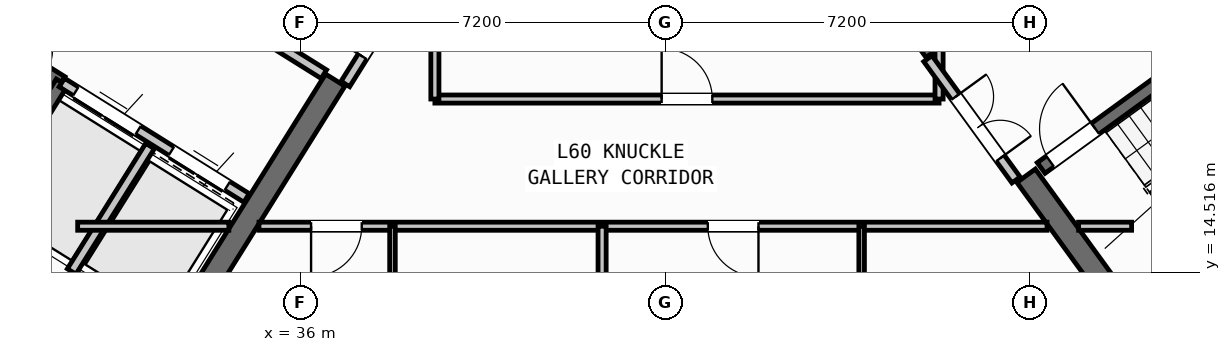
"""IFC4 building model, lengths in metres.
Left out: names, types, materials, properties, quantities, classifications, styles, units other than length and angle.
Written with IfcOpenShell. Run it as: python <this file> out.ifc"""

import sys

from ifc_helpers import new_model, si_unit, direction, frame, frame_2d, origin, place, context, subcontext, project, spatial, rectangle, extrude, source, transform, mapped, element, fill, save


model = new_model("IFC4")
c1 = context("Model", 3, precision=1e-05, world=origin(), true_north=direction((0.0, 1.0)))
c2 = subcontext(c1, "Body", "Model", "MODEL_VIEW")
j1 = project(units=[si_unit("LENGTHUNIT", "METRE"), si_unit("PLANEANGLEUNIT", "RADIAN")], contexts=[c1])
p1 = place(None, origin())
s1 = spatial("IfcSite", under=j1, at=p1, CompositionType="ELEMENT")
p2 = place(p1, origin())
s2 = spatial("IfcBuilding", under=s1, at=p2, CompositionType="ELEMENT")
p3 = place(p2, frame((0.0, 0.0, 238.5)))
s3 = spatial("IfcBuildingStorey", under=s2, at=p3, CompositionType="ELEMENT", Elevation=238.5)
p4 = place(p3, frame((33.324, 12.503, 0.0), z_axis=(0.0, 0.0, 1.0), x_axis=(-0.848043529849, 0.529926571782, 0.0)))
e1 = element("IfcWall", 1, at=p4, inside=s3, PredefinedType="SHEAR", context=c2, shape_type="SweptSolid", body=[
    extrude(rectangle(XDim=13.04, YDim=0.45, at=frame_2d((6.52, 0.0))), origin(), (0.0, 0.0, 1.0), 3.35),
])
p5 = place(p3, frame((36.683, 18.304, 0.0), z_axis=(0.0, 0.0, 1.0), x_axis=(-0.529904039071, -0.848057609704, 0.0)))
e2 = element("IfcWall", 2, at=p5, inside=s3, PredefinedType="SHEAR", context=c2, shape_type="SweptSolid", body=[
    extrude(rectangle(XDim=6.475, YDim=0.45, at=frame_2d((3.238, 0.0))), origin(), (0.0, 0.0, 1.0), 3.35),
])
p6 = place(p3, frame((52.399, 13.169, 0.0), z_axis=(0.0, 0.0, 1.0), x_axis=(0.809022352778, 0.587777877013, 0.0)))
e3 = element("IfcWall", 3, at=p6, inside=s3, PredefinedType="SHEAR", context=c2, shape_type="SweptSolid", body=[
    extrude(rectangle(XDim=12.24, YDim=0.45, at=frame_2d((6.12, 0.0))), origin(), (0.0, 0.0, 1.0), 3.35),
])
p7 = place(p3, frame((52.449, 13.483, 0.0), z_axis=(0.0, 0.0, 1.0), x_axis=(-0.587819244441, 0.808992296542, 0.0)))
e4 = element("IfcWall", 4, at=p7, inside=s3, PredefinedType="SHEAR", context=c2, shape_type="SweptSolid", body=[
    extrude(rectangle(XDim=3.625, YDim=0.45, at=frame_2d((1.812, 0.0))), origin(), (0.0, 0.0, 1.0), 3.35),
])
p8 = place(p3, frame((48.526, 18.884, 0.0), z_axis=(0.0, 0.0, 1.0), x_axis=(-0.587774812919, 0.809024578921, 0.0)))
e5 = element("IfcWall", 5, at=p8, inside=s3, PredefinedType="SHEAR", context=c2, shape_type="SweptSolid", body=[
    extrude(rectangle(XDim=6.475, YDim=0.45, at=frame_2d((3.238, 0.0))), origin(), (0.0, 0.0, 1.0), 3.35),
])
p9 = place(p3, frame((31.28, 18.261, 0.0), z_axis=(0.0, 0.0, 1.0), x_axis=(-0.848051618787, 0.529913626805, 0.0)))
e6 = element("IfcWall", 6, at=p9, inside=s3, PredefinedType="SHEAR", context=c2, shape_type="SweptSolid", body=[
    extrude(rectangle(XDim=7.46, YDim=0.26, at=frame_2d((3.73, 0.0))), origin(), (0.0, 0.0, 1.0), 3.35),
])
p10 = place(p9, frame((0.36, 0.0, 0.0)))
e7 = element("IfcOpeningElement", 7, at=p10, cuts=e6, PredefinedType="OPENING", context=c2, shape_type="SweptSolid", body=[
    extrude(rectangle(XDim=0.86, YDim=2.05, at=frame_2d((0.43, 1.025))), frame((0.0, 0.14, 0.0), z_axis=(0.0, -1.0, 0.0), x_axis=(1.0, 0.0, 0.0)), (0.0, 0.0, 1.0), 0.28),
])
p11 = place(p3, frame((31.288, 18.256, 0.0), z_axis=(0.0, 0.0, 1.0), x_axis=(-0.529943379326, -0.848033026897, 0.0)))
e8 = element("IfcWall", 8, at=p11, inside=s3, PredefinedType="SHEAR", context=c2, shape_type="SweptSolid", body=[
    extrude(rectangle(XDim=3.16, YDim=0.26, at=frame_2d((1.58, 0.0))), origin(), (0.0, 0.0, 1.0), 3.35),
])
p12 = place(p3, frame((34.933, 15.978, 0.0), z_axis=(0.0, 0.0, 1.0), x_axis=(-0.848055739377, 0.529907032327, 0.0)))
e9 = element("IfcWall", 9, at=p12, inside=s3, PredefinedType="STANDARD", context=c2, shape_type="SweptSolid", body=[
    extrude(rectangle(XDim=4.298, YDim=0.2, at=frame_2d((2.149, 0.0))), origin(), (0.0, 0.0, 1.0), 3.34),
])
p13 = place(p12, frame((0.448, 0.0, 0.0)))
e10 = element("IfcOpeningElement", 10, at=p13, cuts=e9, PredefinedType="OPENING", context=c2, shape_type="SweptSolid", body=[
    extrude(rectangle(XDim=1.3, YDim=2.2, at=frame_2d((0.65, 1.1))), frame((0.0, 0.11, 0.0), z_axis=(0.0, -1.0, 0.0), x_axis=(1.0, 0.0, 0.0)), (0.0, 0.0, 1.0), 0.22),
])
p14 = place(p12, frame((2.523, 0.0, 0.0)))
e11 = element("IfcOpeningElement", 11, at=p14, cuts=e9, PredefinedType="OPENING", context=c2, shape_type="SweptSolid", body=[
    extrude(rectangle(XDim=1.45, YDim=2.25, at=frame_2d((0.725, 1.125))), frame((0.0, 0.11, 0.0), z_axis=(0.0, -1.0, 0.0), x_axis=(1.0, 0.0, 0.0)), (0.0, 0.0, 1.0), 0.22),
])
p15 = place(p3, frame((36.459, 18.421, 0.0), z_axis=(0.0, 0.0, 1.0), x_axis=(-0.848059591691, 0.529900867089, 0.0)))
e12 = element("IfcWall", 12, at=p15, inside=s3, PredefinedType="STANDARD", context=c2, shape_type="SweptSolid", body=[
    extrude(rectangle(XDim=5.818, YDim=0.2, at=frame_2d((2.909, 0.0))), origin(), (0.0, 0.0, 1.0), 3.34),
])
p16 = place(p15, frame((2.598, 0.0, 0.0)))
e13 = element("IfcOpeningElement", 13, at=p16, cuts=e12, PredefinedType="OPENING", context=c2, shape_type="SweptSolid", body=[
    extrude(rectangle(XDim=1.15, YDim=2.1, at=frame_2d((0.575, 1.05))), frame((0.0, 0.11, 0.0), z_axis=(0.0, -1.0, 0.0), x_axis=(1.0, 0.0, 0.0)), (0.0, 0.0, 1.0), 0.22),
])
p17 = place(p3, frame((33.029, 17.003, 0.0), z_axis=(0.0, 0.0, 1.0), x_axis=(-0.529916267533, -0.848049968695, 0.0)))
e14 = element("IfcWall", 14, at=p17, inside=s3, PredefinedType="STANDARD", context=c2, shape_type="SweptSolid", body=[
    extrude(rectangle(XDim=2.92, YDim=0.2, at=frame_2d((1.46, 0.0))), origin(), (0.0, 0.0, 1.0), 3.34),
])
p18 = place(p3, frame((52.472, 14.013, 0.0), z_axis=(0.0, 0.0, 1.0), x_axis=(0.809028366311, 0.587769599847, 0.0)))
e15 = element("IfcWall", 15, at=p18, inside=s3, PredefinedType="SHEAR", context=c2, shape_type="SweptSolid", body=[
    extrude(rectangle(XDim=7.33, YDim=0.26, at=frame_2d((3.665, 0.0))), origin(), (0.0, 0.0, 1.0), 3.35),
])
p19 = place(p3, frame((50.615, 16.57, 0.0), z_axis=(0.0, 0.0, 1.0), x_axis=(0.809028366311, 0.587769599847, 0.0)))
e16 = element("IfcWall", 16, at=p19, inside=s3, PredefinedType="SHEAR", context=c2, shape_type="SweptSolid", body=[
    extrude(rectangle(XDim=7.33, YDim=0.26, at=frame_2d((3.665, 0.0))), origin(), (0.0, 0.0, 1.0), 3.35),
])
p20 = place(p19, frame((0.22, 0.0, 0.0)))
e17 = element("IfcOpeningElement", 17, at=p20, cuts=e16, PredefinedType="OPENING", context=c2, shape_type="SweptSolid", body=[
    extrude(rectangle(XDim=1.1, YDim=2.1, at=frame_2d((0.55, 1.05))), frame((0.0, 0.14, 0.0), z_axis=(0.0, -1.0, 0.0), x_axis=(1.0, 0.0, 0.0)), (0.0, 0.0, 1.0), 0.28),
])
p21 = place(p3, frame((32.164, 10.374, 0.0), z_axis=(0.0, 0.0, 1.0), x_axis=(-0.848044107957, 0.529925646633, 0.0)))
e18 = element("IfcWall", 18, at=p21, inside=s3, PredefinedType="PARTITIONING", context=c2, shape_type="SweptSolid", body=[
    extrude(rectangle(XDim=15.57, YDim=0.16, at=frame_2d((7.785, 0.0))), origin(), (0.0, 0.0, 1.0), 3.34),
])
p22 = place(p21, frame((10.83, 0.0, 0.0)))
e19 = element("IfcOpeningElement", 19, at=p22, cuts=e18, PredefinedType="OPENING", context=c2, shape_type="SweptSolid", body=[
    extrude(rectangle(XDim=1.0, YDim=2.1, at=frame_2d((0.5, 1.05))), frame((0.0, 0.09, 0.0), z_axis=(0.0, -1.0, 0.0), x_axis=(1.0, 0.0, 0.0)), (0.0, 0.0, 1.0), 0.18),
])
p23 = place(p3, frame((38.451, 20.737, 0.0), z_axis=(0.0, 0.0, 1.0), x_axis=(-0.529924799939, -0.848044637038, 0.0)))
e20 = element("IfcWall", 20, at=p23, inside=s3, PredefinedType="STANDARD", context=c2, shape_type="SweptSolid", body=[
    extrude(rectangle(XDim=2.96, YDim=0.2, at=frame_2d((1.48, 0.0))), origin(), (0.0, 0.0, 1.0), 3.34),
])
p24 = place(p23, frame((1.46, 0.0, 0.0)))
e21 = element("IfcOpeningElement", 21, at=p24, cuts=e20, PredefinedType="OPENING", context=c2, shape_type="SweptSolid", body=[
    extrude(rectangle(XDim=0.86, YDim=2.05, at=frame_2d((0.43, 1.025))), frame((0.0, 0.11, 0.0), z_axis=(0.0, -1.0, 0.0), x_axis=(1.0, 0.0, 0.0)), (0.0, 0.0, 1.0), 0.22),
])
p25 = place(p3, frame((31.6, 15.42, 0.0), z_axis=(0.0, 0.0, 1.0), x_axis=(1.0, 0.0, 0.0)))
e22 = element("IfcWall", 22, at=p25, inside=s3, PredefinedType="PARTITIONING", context=c2, shape_type="SweptSolid", body=[
    extrude(rectangle(XDim=2.984, YDim=0.16, at=frame_2d((1.492, 0.0))), origin(), (0.0, 0.0, 1.0), 3.34),
])
p26 = place(p3, frame((35.178, 15.42, 0.0), z_axis=(0.0, 0.0, 1.0), x_axis=(1.0, 0.0, 0.0)))
e23 = element("IfcWall", 23, at=p26, inside=s3, PredefinedType="PARTITIONING", context=c2, shape_type="SweptSolid", body=[
    extrude(rectangle(XDim=15.552, YDim=0.16, at=frame_2d((7.776, 0.0))), origin(), (0.0, 0.0, 1.0), 3.34),
])
p27 = place(p26, frame((1.028, 0.0, 0.0)))
e24 = element("IfcOpeningElement", 24, at=p27, cuts=e23, PredefinedType="OPENING", context=c2, shape_type="SweptSolid", body=[
    extrude(rectangle(XDim=1.0, YDim=2.1, at=frame_2d((0.5, 1.05))), frame((0.0, 0.09, 0.0), z_axis=(0.0, -1.0, 0.0), x_axis=(1.0, 0.0, 0.0)), (0.0, 0.0, 1.0), 0.18),
])
p28 = place(p26, frame((8.858, 0.0, 0.0)))
e25 = element("IfcOpeningElement", 25, at=p28, cuts=e23, PredefinedType="OPENING", context=c2, shape_type="SweptSolid", body=[
    extrude(rectangle(XDim=1.0, YDim=2.1, at=frame_2d((0.5, 1.05))), frame((0.0, 0.09, 0.0), z_axis=(0.0, -1.0, 0.0), x_axis=(1.0, 0.0, 0.0)), (0.0, 0.0, 1.0), 0.18),
])
p29 = place(p3, frame((51.354, 15.42, 0.0), z_axis=(0.0, 0.0, 1.0), x_axis=(1.0, 0.0, 0.0)))
e26 = element("IfcWall", 26, at=p29, inside=s3, PredefinedType="PARTITIONING", context=c2, shape_type="SweptSolid", body=[
    extrude(rectangle(XDim=1.046, YDim=0.16, at=frame_2d((0.523, 0.0))), origin(), (0.0, 0.0, 1.0), 3.34),
])
p30 = place(p3, frame((38.65, 17.93, 0.0), z_axis=(0.0, 0.0, 1.0), x_axis=(1.0, 0.0, 0.0)))
e27 = element("IfcWall", 27, at=p30, inside=s3, PredefinedType="PARTITIONING", context=c2, shape_type="SweptSolid", body=[
    extrude(rectangle(XDim=9.95, YDim=0.16, at=frame_2d((4.975, 0.0))), origin(), (0.0, 0.0, 1.0), 3.34),
])
p31 = place(p30, frame((4.475, 0.0, 0.0)))
e28 = element("IfcOpeningElement", 28, at=p31, cuts=e27, PredefinedType="OPENING", context=c2, shape_type="SweptSolid", body=[
    extrude(rectangle(XDim=1.0, YDim=2.1, at=frame_2d((0.5, 1.05))), frame((0.0, 0.09, 0.0), z_axis=(0.0, -1.0, 0.0), x_axis=(1.0, 0.0, 0.0)), (0.0, 0.0, 1.0), 0.18),
])
p32 = place(p3, frame((38.65, 17.93, 0.0), z_axis=(0.0, 0.0, 1.0), x_axis=(0.0, 1.0, 0.0)))
e29 = element("IfcWall", 29, at=p32, inside=s3, PredefinedType="PARTITIONING", context=c2, shape_type="SweptSolid", body=[
    extrude(rectangle(XDim=3.046, YDim=0.16, at=frame_2d((1.523, 0.0))), origin(), (0.0, 0.0, 1.0), 3.34),
])
p33 = place(p3, frame((48.6, 17.93, 0.0), z_axis=(0.0, 0.0, 1.0), x_axis=(0.0, 1.0, 0.0)))
e30 = element("IfcWall", 30, at=p33, inside=s3, PredefinedType="PARTITIONING", context=c2, shape_type="SweptSolid", body=[
    extrude(rectangle(XDim=0.993, YDim=0.16, at=frame_2d((0.496, 0.0))), origin(), (0.0, 0.0, 1.0), 3.34),
])
p34 = place(p3, frame((50.119, 16.333, 0.0), z_axis=(0.0, 0.0, 1.0), x_axis=(-0.587749856981, 0.809042709391, 0.0)))
e31 = element("IfcWall", 31, at=p34, inside=s3, PredefinedType="STANDARD", context=c2, shape_type="SweptSolid", body=[
    extrude(rectangle(XDim=2.96, YDim=0.2, at=frame_2d((1.48, 0.0))), origin(), (0.0, 0.0, 1.0), 3.34),
])
p35 = place(p34, frame((0.53, 0.0, 0.0)))
e32 = element("IfcOpeningElement", 32, at=p35, cuts=e31, PredefinedType="OPENING", context=c2, shape_type="SweptSolid", body=[
    extrude(rectangle(XDim=1.5, YDim=2.15, at=frame_2d((0.75, 1.075))), frame((0.0, 0.11, 0.0), z_axis=(0.0, -1.0, 0.0), x_axis=(1.0, 0.0, 0.0)), (0.0, 0.0, 1.0), 0.22),
])
p36 = place(p3, frame((41.95, 1.96, 0.0), z_axis=(0.0, 0.0, 1.0), x_axis=(0.0, 1.0, 0.0)))
e33 = element("IfcWall", 33, at=p36, inside=s3, PredefinedType="PARTITIONING", context=c2, shape_type="SweptSolid", body=[
    extrude(rectangle(XDim=13.46, YDim=0.16, at=frame_2d((6.73, 0.0))), origin(), (0.0, 0.0, 1.0), 3.34),
])
p37 = place(p3, frame((37.813, 1.96, 0.0), z_axis=(0.0, 0.0, 1.0), x_axis=(0.0, 1.0, 0.0)))
e34 = element("IfcWall", 34, at=p37, inside=s3, PredefinedType="PARTITIONING", context=c2, shape_type="SweptSolid", body=[
    extrude(rectangle(XDim=13.46, YDim=0.11, at=frame_2d((6.73, 0.0))), origin(), (0.0, 0.0, 1.0), 3.34),
])
p38 = place(p37, frame((5.5, 0.0, 0.0)))
e35 = element("IfcOpeningElement", 35, at=p38, cuts=e34, PredefinedType="OPENING", context=c2, shape_type="SweptSolid", body=[
    extrude(rectangle(XDim=0.92, YDim=2.08, at=frame_2d((0.46, 1.04))), frame((0.0, 0.065, 0.0), z_axis=(0.0, -1.0, 0.0), x_axis=(1.0, 0.0, 0.0)), (0.0, 0.0, 1.0), 0.13),
])
p39 = place(p37, frame((10.89, 0.0, 0.0)))
e36 = element("IfcOpeningElement", 36, at=p39, cuts=e34, PredefinedType="OPENING", context=c2, shape_type="SweptSolid", body=[
    extrude(rectangle(XDim=0.88, YDim=2.08, at=frame_2d((0.44, 1.04))), frame((0.0, 0.065, 0.0), z_axis=(0.0, -1.0, 0.0), x_axis=(1.0, 0.0, 0.0)), (0.0, 0.0, 1.0), 0.13),
])
p40 = place(p3, frame((47.072, 1.96, 0.0), z_axis=(0.0, 0.0, 1.0), x_axis=(0.0, 1.0, 0.0)))
e37 = element("IfcWall", 37, at=p40, inside=s3, PredefinedType="PARTITIONING", context=c2, shape_type="SweptSolid", body=[
    extrude(rectangle(XDim=13.46, YDim=0.11, at=frame_2d((6.73, 0.0))), origin(), (0.0, 0.0, 1.0), 3.34),
])
p41 = place(p40, frame((6.6, 0.0, 0.0)))
e38 = element("IfcOpeningElement", 38, at=p41, cuts=e37, PredefinedType="OPENING", context=c2, shape_type="SweptSolid", body=[
    extrude(rectangle(XDim=0.92, YDim=2.08, at=frame_2d((0.46, 1.04))), frame((0.0, 0.065, 0.0), z_axis=(0.0, -1.0, 0.0), x_axis=(1.0, 0.0, 0.0)), (0.0, 0.0, 1.0), 0.13),
])
p42 = place(p40, frame((11.54, 0.0, 0.0)))
e39 = element("IfcOpeningElement", 39, at=p42, cuts=e37, PredefinedType="OPENING", context=c2, shape_type="SweptSolid", body=[
    extrude(rectangle(XDim=0.88, YDim=2.08, at=frame_2d((0.44, 1.04))), frame((0.0, 0.065, 0.0), z_axis=(0.0, -1.0, 0.0), x_axis=(1.0, 0.0, 0.0)), (0.0, 0.0, 1.0), 0.13),
])
m1 = source(origin(), c2, "Body", "SweptSolid", [
    extrude(rectangle(XDim=1.3, YDim=2.2, at=frame_2d((0.65, 1.1))), frame((0.0, 0.025, 0.0), z_axis=(0.0, -1.0, 0.0), x_axis=(1.0, 0.0, 0.0)), (0.0, 0.0, 1.0), 0.05),
])
p43 = place(p13, origin())
e40 = element("IfcDoor", 40, at=p43, inside=s3, OperationType="DOUBLE_DOOR_SLIDING", PredefinedType="DOOR", context=c2, shape_type="MappedRepresentation", body=[
    mapped(m1, transform((0.0, 0.0, 0.0), scale=1.0)),
])
fill(e10, e40)
m2 = source(origin(), c2, "Body", "SweptSolid", [
    extrude(rectangle(XDim=1.45, YDim=2.25, at=frame_2d((0.725, 1.125))), frame((0.0, 0.025, 0.0), z_axis=(0.0, -1.0, 0.0), x_axis=(1.0, 0.0, 0.0)), (0.0, 0.0, 1.0), 0.05),
])
p44 = place(p14, origin())
e41 = element("IfcDoor", 41, at=p44, inside=s3, OperationType="DOUBLE_DOOR_SLIDING", PredefinedType="DOOR", context=c2, shape_type="MappedRepresentation", body=[
    mapped(m2, transform((0.0, 0.0, 0.0), scale=1.0)),
])
fill(e11, e41)
m3 = source(origin(), c2, "Body", "SweptSolid", [
    extrude(rectangle(XDim=1.1, YDim=2.1, at=frame_2d((0.55, 1.05))), frame((0.0, 0.025, 0.0), z_axis=(0.0, -1.0, 0.0), x_axis=(1.0, 0.0, 0.0)), (0.0, 0.0, 1.0), 0.05),
])
p45 = place(p20, origin())
e42 = element("IfcDoor", 42, at=p45, inside=s3, OperationType="SINGLE_SWING_RIGHT", PredefinedType="DOOR", context=c2, shape_type="MappedRepresentation", body=[
    mapped(m3, transform((0.0, 0.0, 0.0), scale=1.0)),
])
fill(e17, e42)
m4 = source(origin(), c2, "Body", "SweptSolid", [
    extrude(rectangle(XDim=1.0, YDim=2.1, at=frame_2d((0.5, 1.05))), frame((0.0, 0.025, 0.0), z_axis=(0.0, -1.0, 0.0), x_axis=(1.0, 0.0, 0.0)), (0.0, 0.0, 1.0), 0.05),
])
p46 = place(p31, origin())
e43 = element("IfcDoor", 43, at=p46, inside=s3, OperationType="SINGLE_SWING_LEFT", PredefinedType="DOOR", context=c2, shape_type="MappedRepresentation", body=[
    mapped(m4, transform((0.0, 0.0, 0.0), scale=1.0)),
])
fill(e28, e43)
m5 = source(origin(), c2, "Body", "SweptSolid", [
    extrude(rectangle(XDim=0.86, YDim=2.05, at=frame_2d((0.43, 1.025))), frame((0.0, 0.025, 0.0), z_axis=(0.0, -1.0, 0.0), x_axis=(1.0, 0.0, 0.0)), (0.0, 0.0, 1.0), 0.05),
])
p47 = place(p24, frame((0.86, 0.0, 0.0), z_axis=(0.0, 0.0, 1.0), x_axis=(-1.0, 0.0, 0.0)))
e44 = element("IfcDoor", 44, at=p47, inside=s3, OperationType="SINGLE_SWING_LEFT", PredefinedType="DOOR", context=c2, shape_type="MappedRepresentation", body=[
    mapped(m5, transform((0.0, 0.0, 0.0), scale=1.0)),
])
fill(e21, e44)
m6 = source(origin(), c2, "Body", "SweptSolid", [
    extrude(rectangle(XDim=1.5, YDim=2.15, at=frame_2d((0.75, 1.075))), frame((0.0, 0.025, 0.0), z_axis=(0.0, -1.0, 0.0), x_axis=(1.0, 0.0, 0.0)), (0.0, 0.0, 1.0), 0.05),
])
p48 = place(p35, frame((1.5, 0.0, 0.0), z_axis=(0.0, 0.0, 1.0), x_axis=(-1.0, 0.0, 0.0)))
e45 = element("IfcDoor", 45, at=p48, inside=s3, OperationType="DOUBLE_DOOR_SINGLE_SWING", PredefinedType="DOOR", context=c2, shape_type="MappedRepresentation", body=[
    mapped(m6, transform((0.0, 0.0, 0.0), scale=1.0)),
])
fill(e32, e45)
p49 = place(p27, frame((1.0, 0.0, 0.0), z_axis=(0.0, 0.0, 1.0), x_axis=(-1.0, 0.0, 0.0)))
e46 = element("IfcDoor", 46, at=p49, inside=s3, OperationType="SINGLE_SWING_RIGHT", PredefinedType="DOOR", context=c2, shape_type="MappedRepresentation", body=[
    mapped(m4, transform((0.0, 0.0, 0.0), scale=1.0)),
])
fill(e24, e46)
p50 = place(p28, frame((1.0, 0.0, 0.0), z_axis=(0.0, 0.0, 1.0), x_axis=(-1.0, 0.0, 0.0)))
e47 = element("IfcDoor", 47, at=p50, inside=s3, OperationType="SINGLE_SWING_LEFT", PredefinedType="DOOR", context=c2, shape_type="MappedRepresentation", body=[
    mapped(m4, transform((0.0, 0.0, 0.0), scale=1.0)),
])
fill(e25, e47)
save(model, sys.argv[1])
